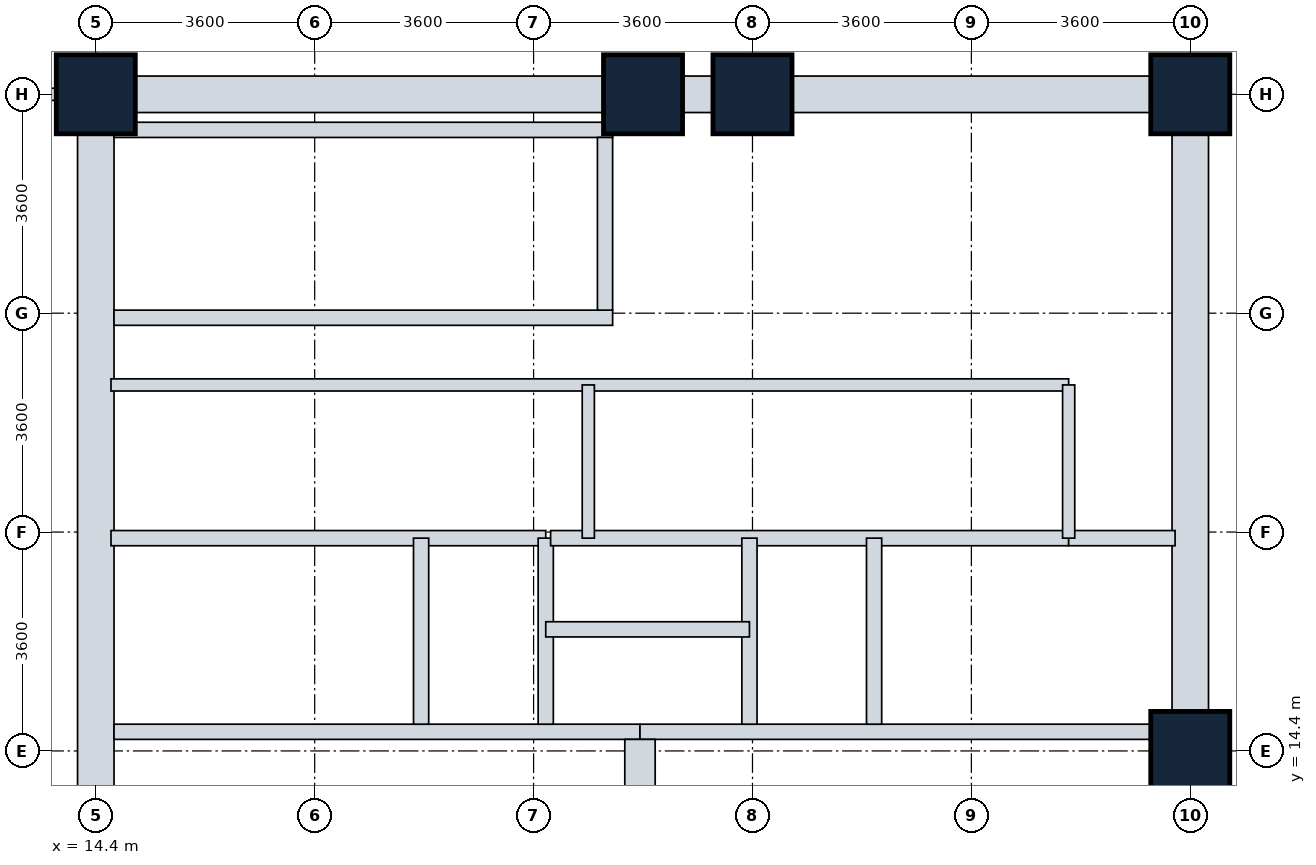
"""IFC4 building model, lengths in metres.
Left out: names, types, materials, properties, quantities, classifications, styles, units other than length and angle.
Written with IfcOpenShell. Run it as: python <this file> out.ifc"""

import sys

from ifc_helpers import new_model, si_unit, direction, frame, frame_2d, origin, origin_2d, place, context, subcontext, project, spatial, rectangle, extrude, element, fill, save


model = new_model("IFC4")
c1 = context("Model", 3, precision=1e-05, world=origin(), true_north=direction((0.0, 1.0)))
c2 = subcontext(c1, "Body", "Model", "MODEL_VIEW")
j1 = project(units=[si_unit("LENGTHUNIT", "METRE"), si_unit("PLANEANGLEUNIT", "RADIAN")], contexts=[c1])
p1 = place(None, origin())
s1 = spatial("IfcSite", under=j1, at=p1, CompositionType="ELEMENT")
p2 = place(p1, origin())
s2 = spatial("IfcBuilding", under=s1, at=p2, CompositionType="ELEMENT")
p3 = place(p2, frame((0.0, 0.0, -4.8)))
s3 = spatial("IfcBuildingStorey", under=s2, at=p3, CompositionType="ELEMENT", Elevation=-4.8)
for number, where, z_axis, x_axis in (
    (1, (14.4, 25.2, 0.0), (0.0, 0.0, 1.0), (1.0, 0.0, 0.0)),
    (2, (23.4, 25.2, 0.0), (0.0, 0.0, 1.0), (1.0, 0.0, 0.0)),
    (3, (25.2, 25.2, 0.0), (0.0, 0.0, 1.0), (1.0, 0.0, 0.0)),
    (4, (32.4, 14.4, 0.0), (0.0, 0.0, 1.0), (1.0, 0.0, 0.0)),
    (5, (32.4, 25.2, 0.0), (0.0, 0.0, 1.0), (1.0, 0.0, 0.0)),
):
    element("IfcColumn", number, at=place(p3, frame(where, z_axis=z_axis, x_axis=x_axis)), inside=s3, PredefinedType="COLUMN", context=c2, shape_type="SweptSolid", body=[
        extrude(rectangle(XDim=1.3, YDim=1.3, at=origin_2d()), origin(), (0.0, 0.0, 1.0), 4.8),
    ])
p4 = place(p3, frame((14.4, 25.2, 0.0), z_axis=(0.0, 0.0, 1.0), x_axis=(1.0, 0.0, 0.0)))
e6 = element("IfcWall", 6, at=p4, inside=s3, PredefinedType="SHEAR", context=c2, shape_type="SweptSolid", body=[
    extrude(rectangle(XDim=18.0, YDim=0.6, at=frame_2d((9.0, 0.0))), origin(), (0.0, 0.0, 1.0), 4.45),
])
p5 = place(p3, frame((14.4, 10.8, 0.0), z_axis=(0.0, 0.0, 1.0), x_axis=(0.0, 1.0, 0.0)))
e7 = element("IfcWall", 7, at=p5, inside=s3, PredefinedType="SHEAR", context=c2, shape_type="SweptSolid", body=[
    extrude(rectangle(XDim=14.4, YDim=0.6, at=frame_2d((7.2, 0.0))), origin(), (0.0, 0.0, 1.0), 4.45),
])
p6 = place(p5, frame((4.9, 0.0, 0.0)))
e8 = element("IfcOpeningElement", 8, at=p6, cuts=e7, PredefinedType="OPENING", context=c2, shape_type="SweptSolid", body=[
    extrude(rectangle(XDim=1.2, YDim=2.1, at=frame_2d((0.6, 1.05))), frame((0.0, 0.31, 0.0), z_axis=(0.0, -1.0, 0.0), x_axis=(1.0, 0.0, 0.0)), (0.0, 0.0, 1.0), 0.62),
])
p7 = place(p3, frame((32.4, 10.8, 0.0), z_axis=(0.0, 0.0, 1.0), x_axis=(0.0, 1.0, 0.0)))
e9 = element("IfcWall", 9, at=p7, inside=s3, PredefinedType="SHEAR", context=c2, shape_type="SweptSolid", body=[
    extrude(rectangle(XDim=14.4, YDim=0.6, at=frame_2d((7.2, 0.0))), origin(), (0.0, 0.0, 1.0), 4.45),
])
p8 = place(p7, frame((4.35, 0.0, 0.0)))
e10 = element("IfcOpeningElement", 10, at=p8, cuts=e9, PredefinedType="OPENING", context=c2, shape_type="SweptSolid", body=[
    extrude(rectangle(XDim=1.2, YDim=2.1, at=frame_2d((0.6, 1.05))), frame((0.0, 0.31, 0.0), z_axis=(0.0, -1.0, 0.0), x_axis=(1.0, 0.0, 0.0)), (0.0, 0.0, 1.0), 0.62),
])
p9 = place(p7, frame((10.0, 0.0, 0.0)))
e11 = element("IfcOpeningElement", 11, at=p9, cuts=e9, PredefinedType="OPENING", context=c2, shape_type="SweptSolid", body=[
    extrude(rectangle(XDim=1.2, YDim=2.1, at=frame_2d((0.6, 1.05))), frame((0.0, 0.31, 0.0), z_axis=(0.0, -1.0, 0.0), x_axis=(1.0, 0.0, 0.0)), (0.0, 0.0, 1.0), 0.62),
])
p10 = place(p3, frame((14.7, 14.715, 0.0), z_axis=(0.0, 0.0, 1.0), x_axis=(1.0, 0.0, 0.0)))
e12 = element("IfcWall", 12, at=p10, inside=s3, PredefinedType="SHEAR", context=c2, shape_type="SweptSolid", body=[
    extrude(rectangle(XDim=8.65, YDim=0.25, at=frame_2d((4.325, 0.0))), origin(), (0.0, 0.0, 1.0), 4.45),
])
p11 = place(p10, frame((0.655, 0.0, 0.0)))
e13 = element("IfcOpeningElement", 13, at=p11, cuts=e12, PredefinedType="OPENING", context=c2, shape_type="SweptSolid", body=[
    extrude(rectangle(XDim=1.1, YDim=2.1, at=frame_2d((0.55, 1.05))), frame((0.0, 0.135, 0.0), z_axis=(0.0, -1.0, 0.0), x_axis=(1.0, 0.0, 0.0)), (0.0, 0.0, 1.0), 0.27),
])
p12 = place(p3, frame((23.35, 14.715, 0.0), z_axis=(0.0, 0.0, 1.0), x_axis=(1.0, 0.0, 0.0)))
e14 = element("IfcWall", 14, at=p12, inside=s3, PredefinedType="SHEAR", context=c2, shape_type="SweptSolid", body=[
    extrude(rectangle(XDim=8.75, YDim=0.25, at=frame_2d((4.375, 0.0))), origin(), (0.0, 0.0, 1.0), 4.45),
])
p13 = place(p12, frame((6.775, 0.0, 0.0)))
e15 = element("IfcOpeningElement", 15, at=p13, cuts=e14, PredefinedType="OPENING", context=c2, shape_type="SweptSolid", body=[
    extrude(rectangle(XDim=1.1, YDim=2.1, at=frame_2d((0.55, 1.05))), frame((0.0, 0.135, 0.0), z_axis=(0.0, -1.0, 0.0), x_axis=(1.0, 0.0, 0.0)), (0.0, 0.0, 1.0), 0.27),
])
p14 = place(p3, frame((23.35, 11.75, 0.0), z_axis=(0.0, 0.0, 1.0), x_axis=(0.0, 1.0, 0.0)))
e16 = element("IfcWall", 16, at=p14, inside=s3, PredefinedType="SHEAR", context=c2, shape_type="SweptSolid", body=[
    extrude(rectangle(XDim=2.84, YDim=0.5, at=frame_2d((1.42, 0.0))), origin(), (0.0, 0.0, 1.0), 4.45),
])
for number, where, z_axis, x_axis in (
    (17, (14.7, 21.525, 0.0), (0.0, 0.0, 1.0), (1.0, 0.0, 0.0)),
    (18, (14.7, 24.615, 0.0), (0.0, 0.0, 1.0), (1.0, 0.0, 0.0)),
):
    element("IfcWall", number, at=place(p3, frame(where, z_axis=z_axis, x_axis=x_axis)), inside=s3, PredefinedType="SHEAR", context=c2, shape_type="SweptSolid", body=[
        extrude(rectangle(XDim=8.2, YDim=0.25, at=frame_2d((4.1, 0.0))), origin(), (0.0, 0.0, 1.0), 4.45),
    ])
p15 = place(p3, frame((22.775, 21.65, 0.0), z_axis=(0.0, 0.0, 1.0), x_axis=(0.0, 1.0, 0.0)))
e19 = element("IfcWall", 19, at=p15, inside=s3, PredefinedType="SHEAR", context=c2, shape_type="SweptSolid", body=[
    extrude(rectangle(XDim=2.84, YDim=0.25, at=frame_2d((1.42, 0.0))), origin(), (0.0, 0.0, 1.0), 4.45),
])
p16 = place(p3, frame((14.65, 17.9, 0.0), z_axis=(0.0, 0.0, 1.0), x_axis=(1.0, 0.0, 0.0)))
e20 = element("IfcWall", 20, at=p16, inside=s3, PredefinedType="PARTITIONING", context=c2, shape_type="SweptSolid", body=[
    extrude(rectangle(XDim=7.15, YDim=0.25, at=frame_2d((3.575, 0.0))), origin(), (0.0, 0.0, 1.0), 4.435),
])
p17 = place(p3, frame((19.75, 14.84, 0.0), z_axis=(0.0, 0.0, 1.0), x_axis=(0.0, 1.0, 0.0)))
e21 = element("IfcWall", 21, at=p17, inside=s3, PredefinedType="PARTITIONING", context=c2, shape_type="SweptSolid", body=[
    extrude(rectangle(XDim=3.06, YDim=0.25, at=frame_2d((1.53, 0.0))), origin(), (0.0, 0.0, 1.0), 4.435),
])
p18 = place(p17, frame((0.98, 0.0, 0.0)))
e22 = element("IfcOpeningElement", 22, at=p18, cuts=e21, PredefinedType="OPENING", context=c2, shape_type="SweptSolid", body=[
    extrude(rectangle(XDim=1.1, YDim=2.1, at=frame_2d((0.55, 1.05))), frame((0.0, 0.135, 0.0), z_axis=(0.0, -1.0, 0.0), x_axis=(1.0, 0.0, 0.0)), (0.0, 0.0, 1.0), 0.27),
])
p19 = place(p3, frame((21.8, 14.84, 0.0), z_axis=(0.0, 0.0, 1.0), x_axis=(0.0, 1.0, 0.0)))
e23 = element("IfcWall", 23, at=p19, inside=s3, PredefinedType="PARTITIONING", context=c2, shape_type="SweptSolid", body=[
    extrude(rectangle(XDim=3.06, YDim=0.25, at=frame_2d((1.53, 0.0))), origin(), (0.0, 0.0, 1.0), 4.435),
])
p20 = place(p3, frame((21.88, 17.9, 0.0), z_axis=(0.0, 0.0, 1.0), x_axis=(1.0, 0.0, 0.0)))
e24 = element("IfcWall", 24, at=p20, inside=s3, PredefinedType="PARTITIONING", context=c2, shape_type="SweptSolid", body=[
    extrude(rectangle(XDim=8.52, YDim=0.25, at=frame_2d((4.26, 0.0))), origin(), (0.0, 0.0, 1.0), 4.435),
])
p21 = place(p3, frame((30.4, 17.9, 0.0), z_axis=(0.0, 0.0, 1.0), x_axis=(1.0, 0.0, 0.0)))
e25 = element("IfcWall", 25, at=p21, inside=s3, PredefinedType="PARTITIONING", context=c2, shape_type="SweptSolid", body=[
    extrude(rectangle(XDim=1.75, YDim=0.25, at=frame_2d((0.875, 0.0))), origin(), (0.0, 0.0, 1.0), 4.435),
])
p22 = place(p21, frame((0.32, 0.0, 0.0)))
e26 = element("IfcOpeningElement", 26, at=p22, cuts=e25, PredefinedType="OPENING", context=c2, shape_type="SweptSolid", body=[
    extrude(rectangle(XDim=1.1, YDim=2.1, at=frame_2d((0.55, 1.05))), frame((0.0, 0.135, 0.0), z_axis=(0.0, -1.0, 0.0), x_axis=(1.0, 0.0, 0.0)), (0.0, 0.0, 1.0), 0.27),
])
p23 = place(p3, frame((25.15, 14.84, 0.0), z_axis=(0.0, 0.0, 1.0), x_axis=(0.0, 1.0, 0.0)))
e27 = element("IfcWall", 27, at=p23, inside=s3, PredefinedType="PARTITIONING", context=c2, shape_type="SweptSolid", body=[
    extrude(rectangle(XDim=3.06, YDim=0.25, at=frame_2d((1.53, 0.0))), origin(), (0.0, 0.0, 1.0), 4.435),
])
p24 = place(p3, frame((27.2, 14.84, 0.0), z_axis=(0.0, 0.0, 1.0), x_axis=(0.0, 1.0, 0.0)))
e28 = element("IfcWall", 28, at=p24, inside=s3, PredefinedType="PARTITIONING", context=c2, shape_type="SweptSolid", body=[
    extrude(rectangle(XDim=3.06, YDim=0.25, at=frame_2d((1.53, 0.0))), origin(), (0.0, 0.0, 1.0), 4.435),
])
p25 = place(p24, frame((0.98, 0.0, 0.0)))
e29 = element("IfcOpeningElement", 29, at=p25, cuts=e28, PredefinedType="OPENING", context=c2, shape_type="SweptSolid", body=[
    extrude(rectangle(XDim=1.1, YDim=2.1, at=frame_2d((0.55, 1.05))), frame((0.0, 0.135, 0.0), z_axis=(0.0, -1.0, 0.0), x_axis=(1.0, 0.0, 0.0)), (0.0, 0.0, 1.0), 0.27),
])
p26 = place(p3, frame((21.8, 16.4, 0.0), z_axis=(0.0, 0.0, 1.0), x_axis=(1.0, 0.0, 0.0)))
e30 = element("IfcWall", 30, at=p26, inside=s3, PredefinedType="PARTITIONING", context=c2, shape_type="SweptSolid", body=[
    extrude(rectangle(XDim=3.35, YDim=0.25, at=frame_2d((1.675, 0.0))), origin(), (0.0, 0.0, 1.0), 4.435),
])
p27 = place(p3, frame((14.65, 20.42, 0.0), z_axis=(0.0, 0.0, 1.0), x_axis=(1.0, 0.0, 0.0)))
e31 = element("IfcWall", 31, at=p27, inside=s3, PredefinedType="PARTITIONING", context=c2, shape_type="SweptSolid", body=[
    extrude(rectangle(XDim=15.75, YDim=0.2, at=frame_2d((7.875, 0.0))), origin(), (0.0, 0.0, 1.0), 4.435),
])
p28 = place(p27, frame((3.4, 0.0, 0.0)))
e32 = element("IfcOpeningElement", 32, at=p28, cuts=e31, PredefinedType="OPENING", context=c2, shape_type="SweptSolid", body=[
    extrude(rectangle(XDim=1.0, YDim=2.1, at=frame_2d((0.5, 1.05))), frame((0.0, 0.11, 0.0), z_axis=(0.0, -1.0, 0.0), x_axis=(1.0, 0.0, 0.0)), (0.0, 0.0, 1.0), 0.22),
])
p29 = place(p27, frame((11.4, 0.0, 0.0)))
e33 = element("IfcOpeningElement", 33, at=p29, cuts=e31, PredefinedType="OPENING", context=c2, shape_type="SweptSolid", body=[
    extrude(rectangle(XDim=1.0, YDim=2.1, at=frame_2d((0.5, 1.05))), frame((0.0, 0.11, 0.0), z_axis=(0.0, -1.0, 0.0), x_axis=(1.0, 0.0, 0.0)), (0.0, 0.0, 1.0), 0.22),
])
for number, where, z_axis, x_axis in (
    (34, (30.4, 17.9, 0.0), (0.0, 0.0, 1.0), (0.0, 1.0, 0.0)),
    (35, (22.5, 17.9, 0.0), (0.0, 0.0, 1.0), (0.0, 1.0, 0.0)),
):
    element("IfcWall", number, at=place(p3, frame(where, z_axis=z_axis, x_axis=x_axis)), inside=s3, PredefinedType="PARTITIONING", context=c2, shape_type="SweptSolid", body=[
        extrude(rectangle(XDim=2.52, YDim=0.2, at=frame_2d((1.26, 0.0))), origin(), (0.0, 0.0, 1.0), 4.435),
    ])
p30 = place(p3, frame((12.504, 25.2, 0.0), z_axis=(0.0, 0.0, 1.0), x_axis=(1.0, 0.0, 0.0)))
e36 = element("IfcWall", 36, at=p30, inside=s3, PredefinedType="PARTITIONING", context=c2, shape_type="SweptSolid", body=[
    extrude(rectangle(XDim=1.592, YDim=0.2, at=frame_2d((0.796, 0.0))), origin(), (0.0, 0.0, 1.0), 4.435),
])
p31 = place(p11, origin())
e37 = element("IfcDoor", 37, at=p31, inside=s3, OperationType="SINGLE_SWING_LEFT", PredefinedType="DOOR", context=c2, shape_type="SweptSolid", body=[
    extrude(rectangle(XDim=1.1, YDim=2.1, at=frame_2d((0.55, 1.05))), frame((0.0, 0.025, 0.0), z_axis=(0.0, -1.0, 0.0), x_axis=(1.0, 0.0, 0.0)), (0.0, 0.0, 1.0), 0.05),
])
fill(e13, e37)
p32 = place(p13, origin())
e38 = element("IfcDoor", 38, at=p32, inside=s3, OperationType="SINGLE_SWING_LEFT", PredefinedType="DOOR", context=c2, shape_type="SweptSolid", body=[
    extrude(rectangle(XDim=1.1, YDim=2.1, at=frame_2d((0.55, 1.05))), frame((0.0, 0.025, 0.0), z_axis=(0.0, -1.0, 0.0), x_axis=(1.0, 0.0, 0.0)), (0.0, 0.0, 1.0), 0.05),
])
fill(e15, e38)
p33 = place(p18, origin())
e39 = element("IfcDoor", 39, at=p33, inside=s3, OperationType="SLIDING_TO_LEFT", PredefinedType="DOOR", context=c2, shape_type="SweptSolid", body=[
    extrude(rectangle(XDim=1.1, YDim=2.1, at=frame_2d((0.55, 1.05))), frame((0.0, 0.025, 0.0), z_axis=(0.0, -1.0, 0.0), x_axis=(1.0, 0.0, 0.0)), (0.0, 0.0, 1.0), 0.05),
])
fill(e22, e39)
p34 = place(p25, origin())
e40 = element("IfcDoor", 40, at=p34, inside=s3, OperationType="SLIDING_TO_LEFT", PredefinedType="DOOR", context=c2, shape_type="SweptSolid", body=[
    extrude(rectangle(XDim=1.1, YDim=2.1, at=frame_2d((0.55, 1.05))), frame((0.0, 0.025, 0.0), z_axis=(0.0, -1.0, 0.0), x_axis=(1.0, 0.0, 0.0)), (0.0, 0.0, 1.0), 0.05),
])
fill(e29, e40)
p35 = place(p6, origin())
e41 = element("IfcDoor", 41, at=p35, inside=s3, OperationType="SINGLE_SWING_RIGHT", PredefinedType="DOOR", context=c2, shape_type="SweptSolid", body=[
    extrude(rectangle(XDim=1.2, YDim=2.1, at=frame_2d((0.6, 1.05))), frame((0.0, 0.025, 0.0), z_axis=(0.0, -1.0, 0.0), x_axis=(1.0, 0.0, 0.0)), (0.0, 0.0, 1.0), 0.05),
])
fill(e8, e41)
p36 = place(p8, origin())
e42 = element("IfcDoor", 42, at=p36, inside=s3, OperationType="SINGLE_SWING_LEFT", PredefinedType="DOOR", context=c2, shape_type="SweptSolid", body=[
    extrude(rectangle(XDim=1.2, YDim=2.1, at=frame_2d((0.6, 1.05))), frame((0.0, 0.025, 0.0), z_axis=(0.0, -1.0, 0.0), x_axis=(1.0, 0.0, 0.0)), (0.0, 0.0, 1.0), 0.05),
])
fill(e10, e42)
p37 = place(p22, origin())
e43 = element("IfcDoor", 43, at=p37, inside=s3, OperationType="SINGLE_SWING_LEFT", PredefinedType="DOOR", context=c2, shape_type="SweptSolid", body=[
    extrude(rectangle(XDim=1.1, YDim=2.1, at=frame_2d((0.55, 1.05))), frame((0.0, 0.025, 0.0), z_axis=(0.0, -1.0, 0.0), x_axis=(1.0, 0.0, 0.0)), (0.0, 0.0, 1.0), 0.05),
])
fill(e26, e43)
p38 = place(p9, origin())
e44 = element("IfcDoor", 44, at=p38, inside=s3, OperationType="SINGLE_SWING_RIGHT", PredefinedType="DOOR", context=c2, shape_type="SweptSolid", body=[
    extrude(rectangle(XDim=1.2, YDim=2.1, at=frame_2d((0.6, 1.05))), frame((0.0, 0.025, 0.0), z_axis=(0.0, -1.0, 0.0), x_axis=(1.0, 0.0, 0.0)), (0.0, 0.0, 1.0), 0.05),
])
fill(e11, e44)
p39 = place(p28, origin())
e45 = element("IfcDoor", 45, at=p39, inside=s3, OperationType="SINGLE_SWING_LEFT", PredefinedType="DOOR", context=c2, shape_type="SweptSolid", body=[
    extrude(rectangle(XDim=1.0, YDim=2.1, at=frame_2d((0.5, 1.05))), frame((0.0, 0.025, 0.0), z_axis=(0.0, -1.0, 0.0), x_axis=(1.0, 0.0, 0.0)), (0.0, 0.0, 1.0), 0.05),
])
fill(e32, e45)
p40 = place(p29, origin())
e46 = element("IfcDoor", 46, at=p40, inside=s3, OperationType="SINGLE_SWING_RIGHT", PredefinedType="DOOR", context=c2, shape_type="SweptSolid", body=[
    extrude(rectangle(XDim=1.0, YDim=2.1, at=frame_2d((0.5, 1.05))), frame((0.0, 0.025, 0.0), z_axis=(0.0, -1.0, 0.0), x_axis=(1.0, 0.0, 0.0)), (0.0, 0.0, 1.0), 0.05),
])
fill(e33, e46)
save(model, sys.argv[1])
